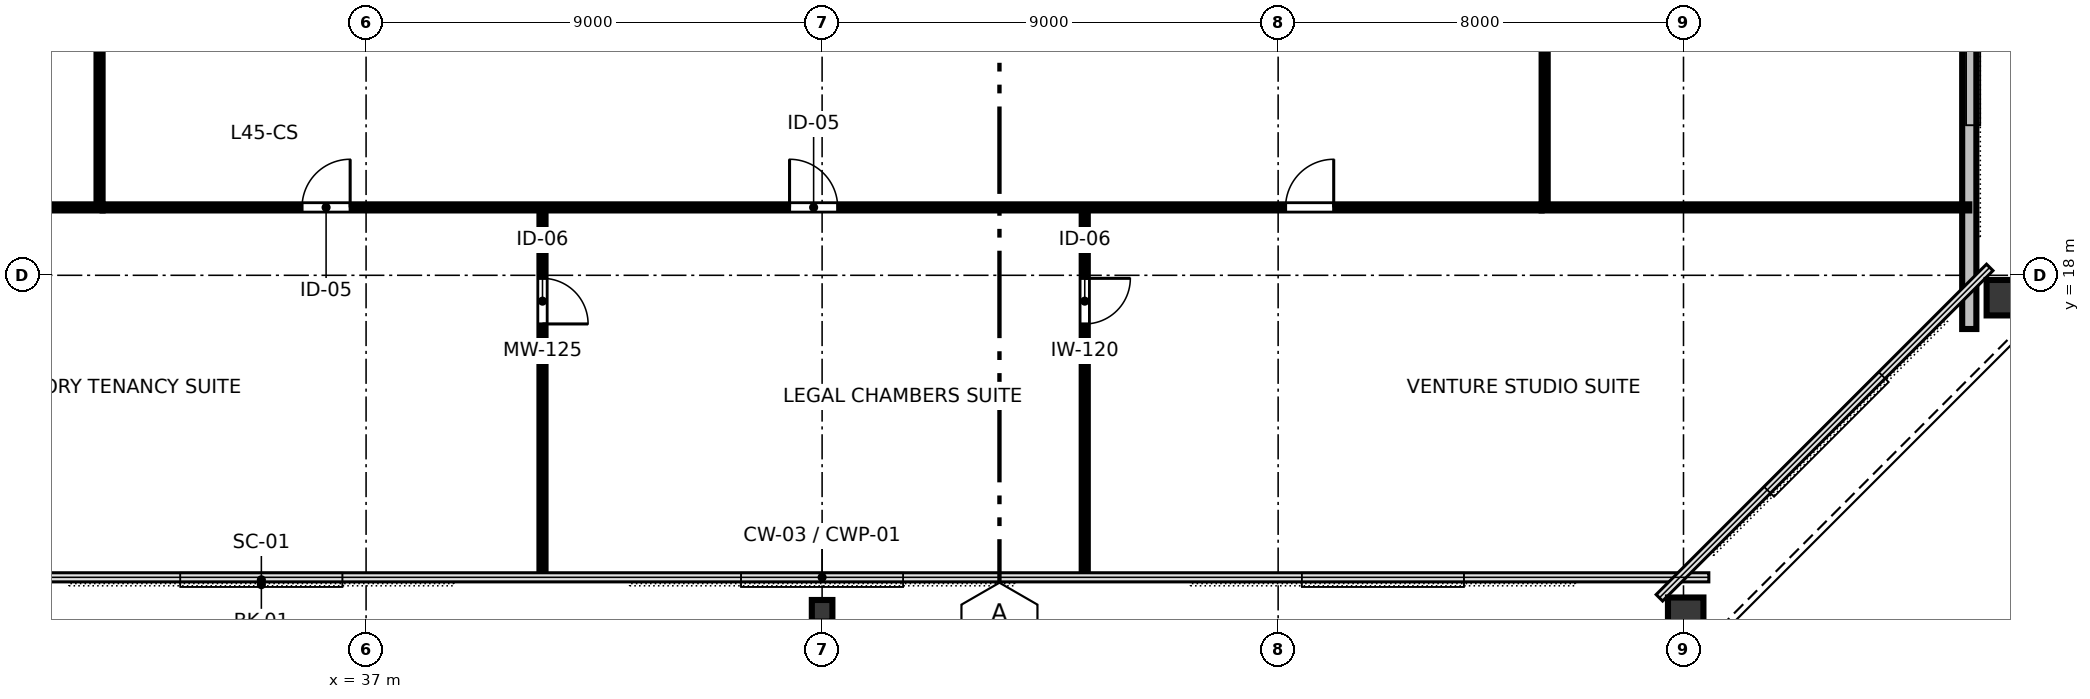
"""IFC4 building model, lengths in metres.
Left out: names, types, materials, properties, quantities, classifications, styles, units other than length and angle.
Written with IfcOpenShell. Run it as: python <this file> out.ifc"""

import sys

from ifc_helpers import new_model, si_unit, direction, frame, frame_2d, origin, origin_2d, place, context, subcontext, project, spatial, rectangle, hollow_rectangle, i_section, extrude, element, fill, save


model = new_model("IFC4")
c1 = context("Model", 3, precision=1e-05, world=origin(), true_north=direction((0.0, 1.0)))
c2 = subcontext(c1, "Body", "Model", "MODEL_VIEW")
j1 = project(units=[si_unit("LENGTHUNIT", "METRE"), si_unit("PLANEANGLEUNIT", "RADIAN")], contexts=[c1])
p1 = place(None, origin())
s1 = spatial("IfcSite", under=j1, at=p1, CompositionType="ELEMENT")
p2 = place(p1, origin())
s2 = spatial("IfcBuilding", under=s1, at=p2, CompositionType="ELEMENT")
p3 = place(p2, frame((0.0, 0.0, 172.0)))
s3 = spatial("IfcBuildingStorey", under=s2, at=p3, CompositionType="ELEMENT", Elevation=172.0)
p4 = place(p3, frame((46.0, 11.38, 0.0), z_axis=(0.0, 0.046233027607, 0.998930681858), x_axis=(-1.0, 0.0, 0.0)))
e1 = element("IfcColumn", 1, at=p4, inside=s3, PredefinedType="COLUMN", context=c2, shape_type="SweptSolid", body=[
    extrude(i_section(OverallWidth=0.406, OverallDepth=0.425, WebThickness=0.033, FlangeThickness=0.052, FilletRadius=0.025, at=origin_2d()), origin(), (0.0, 0.0, 1.0), 4.763),
])
p5 = place(p3, frame((63.043, 11.217, 0.0), z_axis=(-0.062460790535, 0.046397982813, 0.996968342946), x_axis=(-0.596311896623, -0.802752839886, 0.0)))
e2 = element("IfcColumn", 2, at=p5, inside=s3, PredefinedType="COLUMN", context=c2, shape_type="SweptSolid", body=[
    extrude(hollow_rectangle(XDim=0.7, YDim=0.85, WallThickness=0.04, at=origin_2d()), origin(), (0.0, 0.0, 1.0), 4.772),
])
p6 = place(p3, frame((69.407, 17.558, 0.0), z_axis=(-0.054739996676, 0.054074931296, 0.997035322629), x_axis=(0.709306139229, -0.700688401089, 0.076945210577)))
e3 = element("IfcColumn", 3, at=p6, inside=s3, PredefinedType="COLUMN", context=c2, shape_type="SweptSolid", body=[
    extrude(hollow_rectangle(XDim=0.7, YDim=0.85, WallThickness=0.04, at=origin_2d()), origin(), (0.0, 0.0, 1.0), 4.772),
])
p7 = place(p3, frame((68.64, 16.94, 0.0), z_axis=(0.0, 0.0, 1.0), x_axis=(0.0, 1.0, 0.0)))
e4 = element("IfcWall", 4, at=p7, inside=s3, PredefinedType="STANDARD", context=c2, shape_type="SweptSolid", body=[
    extrude(rectangle(XDim=30.12, YDim=0.28, at=frame_2d((15.06, 0.0))), origin(), (0.0, 0.0, 1.0), 4.76),
])
p8 = place(p7, frame((16.56, 0.0, 0.0)))
e5 = element("IfcOpeningElement", 5, at=p8, cuts=e4, PredefinedType="OPENING", context=c2, shape_type="SweptSolid", body=[
    extrude(rectangle(XDim=1.8, YDim=2.2, at=frame_2d((0.9, 1.1))), frame((0.0, 0.15, 0.0), z_axis=(0.0, -1.0, 0.0), x_axis=(1.0, 0.0, 0.0)), (0.0, 0.0, 1.0), 0.3),
])
p9 = place(p7, frame((6.083, 0.0, 0.8)))
e6 = element("IfcOpeningElement", 6, at=p9, cuts=e4, PredefinedType="OPENING", context=c2, shape_type="SweptSolid", body=[
    extrude(rectangle(XDim=2.0, YDim=1.95, at=frame_2d((1.0, 0.975))), frame((0.0, 0.15, 0.0), z_axis=(0.0, -1.0, 0.0), x_axis=(1.0, 0.0, 0.0)), (0.0, 0.0, 1.0), 0.3),
])
p10 = place(p7, frame((10.071, 0.0, 0.8)))
e7 = element("IfcOpeningElement", 7, at=p10, cuts=e4, PredefinedType="OPENING", context=c2, shape_type="SweptSolid", body=[
    extrude(rectangle(XDim=2.0, YDim=1.95, at=frame_2d((1.0, 0.975))), frame((0.0, 0.15, 0.0), z_axis=(0.0, -1.0, 0.0), x_axis=(1.0, 0.0, 0.0)), (0.0, 0.0, 1.0), 0.3),
])
p11 = place(p7, frame((22.037, 0.0, 0.8)))
e8 = element("IfcOpeningElement", 8, at=p11, cuts=e4, PredefinedType="OPENING", context=c2, shape_type="SweptSolid", body=[
    extrude(rectangle(XDim=2.0, YDim=1.95, at=frame_2d((1.0, 0.975))), frame((0.0, 0.15, 0.0), z_axis=(0.0, -1.0, 0.0), x_axis=(1.0, 0.0, 0.0)), (0.0, 0.0, 1.0), 0.3),
])
p12 = place(p3, frame((40.482, 19.34, 0.0), z_axis=(0.0, 0.0, 1.0), x_axis=(0.0, -1.0, 0.0)))
e9 = element("IfcWall", 9, at=p12, inside=s3, PredefinedType="MOVABLE", context=c2, shape_type="SweptSolid", body=[
    extrude(rectangle(XDim=7.3, YDim=0.12, at=frame_2d((3.65, 0.0))), origin(), (0.0, 0.0, 1.0), 4.04),
])
p13 = place(p12, frame((1.4, 0.0, 0.0)))
e10 = element("IfcOpeningElement", 10, at=p13, cuts=e9, PredefinedType="OPENING", context=c2, shape_type="SweptSolid", body=[
    extrude(rectangle(XDim=0.9, YDim=2.15, at=frame_2d((0.45, 1.075))), frame((0.0, 0.07, 0.0), z_axis=(0.0, -1.0, 0.0), x_axis=(1.0, 0.0, 0.0)), (0.0, 0.0, 1.0), 0.14),
])
p14 = place(p3, frame((51.183, 19.34, 0.0), z_axis=(0.0, 0.0, 1.0), x_axis=(0.0, -1.0, 0.0)))
e11 = element("IfcWall", 11, at=p14, inside=s3, PredefinedType="PARTITIONING", context=c2, shape_type="SweptSolid", body=[
    extrude(rectangle(XDim=7.3, YDim=0.12, at=frame_2d((3.65, 0.0))), origin(), (0.0, 0.0, 1.0), 4.04),
])
p15 = place(p14, frame((1.4, 0.0, 0.0)))
e12 = element("IfcOpeningElement", 12, at=p15, cuts=e11, PredefinedType="OPENING", context=c2, shape_type="SweptSolid", body=[
    extrude(rectangle(XDim=0.9, YDim=2.15, at=frame_2d((0.45, 1.075))), frame((0.0, 0.07, 0.0), z_axis=(0.0, -1.0, 0.0), x_axis=(1.0, 0.0, 0.0)), (0.0, 0.0, 1.0), 0.14),
])
p16 = place(p3, frame((31.8, 19.34, 0.0), z_axis=(0.0, 0.0, 1.0), x_axis=(1.0, 0.0, 0.0)))
e13 = element("IfcWall", 13, at=p16, inside=s3, PredefinedType="PARTITIONING", context=c2, shape_type="SweptSolid", body=[
    extrude(rectangle(XDim=28.4, YDim=0.12, at=frame_2d((14.2, 0.0))), origin(), (0.0, 0.0, 1.0), 4.04),
])
p17 = place(p16, frame((3.936, 0.0, 0.0)))
e14 = element("IfcOpeningElement", 14, at=p17, cuts=e13, PredefinedType="OPENING", context=c2, shape_type="SweptSolid", body=[
    extrude(rectangle(XDim=0.95, YDim=2.15, at=frame_2d((0.475, 1.075))), frame((0.0, 0.07, 0.0), z_axis=(0.0, -1.0, 0.0), x_axis=(1.0, 0.0, 0.0)), (0.0, 0.0, 1.0), 0.14),
])
p18 = place(p16, frame((13.558, 0.0, 0.0)))
e15 = element("IfcOpeningElement", 15, at=p18, cuts=e13, PredefinedType="OPENING", context=c2, shape_type="SweptSolid", body=[
    extrude(rectangle(XDim=0.95, YDim=2.15, at=frame_2d((0.475, 1.075))), frame((0.0, 0.07, 0.0), z_axis=(0.0, -1.0, 0.0), x_axis=(1.0, 0.0, 0.0)), (0.0, 0.0, 1.0), 0.14),
])
p19 = place(p16, frame((23.347, 0.0, 0.0)))
e16 = element("IfcOpeningElement", 16, at=p19, cuts=e13, PredefinedType="OPENING", context=c2, shape_type="SweptSolid", body=[
    extrude(rectangle(XDim=0.95, YDim=2.15, at=frame_2d((0.475, 1.075))), frame((0.0, 0.07, 0.0), z_axis=(0.0, -1.0, 0.0), x_axis=(1.0, 0.0, 0.0)), (0.0, 0.0, 1.0), 0.14),
])
p20 = place(p3, frame((31.74, 19.4, 0.0), z_axis=(0.0, 0.0, 1.0), x_axis=(0.0, 1.0, 0.0)))
e17 = element("IfcWall", 17, at=p20, inside=s3, PredefinedType="PARTITIONING", context=c2, shape_type="SweptSolid", body=[
    extrude(rectangle(XDim=11.58, YDim=0.12, at=frame_2d((5.79, 0.0))), origin(), (0.0, 0.0, 1.0), 4.04),
])
p21 = place(p20, frame((3.701, 0.0, 0.0)))
e18 = element("IfcOpeningElement", 18, at=p21, cuts=e17, PredefinedType="OPENING", context=c2, shape_type="SweptSolid", body=[
    extrude(rectangle(XDim=0.95, YDim=2.15, at=frame_2d((0.475, 1.075))), frame((0.0, 0.07, 0.0), z_axis=(0.0, -1.0, 0.0), x_axis=(1.0, 0.0, 0.0)), (0.0, 0.0, 1.0), 0.14),
])
p22 = place(p20, frame((9.391, 0.0, 0.0)))
e19 = element("IfcOpeningElement", 19, at=p22, cuts=e17, PredefinedType="OPENING", context=c2, shape_type="SweptSolid", body=[
    extrude(rectangle(XDim=0.95, YDim=2.15, at=frame_2d((0.475, 1.075))), frame((0.0, 0.07, 0.0), z_axis=(0.0, -1.0, 0.0), x_axis=(1.0, 0.0, 0.0)), (0.0, 0.0, 1.0), 0.14),
])
p23 = place(p3, frame((60.26, 19.4, 0.0), z_axis=(0.0, 0.0, 1.0), x_axis=(0.0, 1.0, 0.0)))
e20 = element("IfcWall", 20, at=p23, inside=s3, PredefinedType="PARTITIONING", context=c2, shape_type="SweptSolid", body=[
    extrude(rectangle(XDim=11.58, YDim=0.12, at=frame_2d((5.79, 0.0))), origin(), (0.0, 0.0, 1.0), 4.04),
])
p24 = place(p23, frame((3.275, 0.0, 0.0)))
e21 = element("IfcOpeningElement", 21, at=p24, cuts=e20, PredefinedType="OPENING", context=c2, shape_type="SweptSolid", body=[
    extrude(rectangle(XDim=0.95, YDim=2.15, at=frame_2d((0.475, 1.075))), frame((0.0, 0.07, 0.0), z_axis=(0.0, -1.0, 0.0), x_axis=(1.0, 0.0, 0.0)), (0.0, 0.0, 1.0), 0.14),
])
p25 = place(p23, frame((8.965, 0.0, 0.0)))
e22 = element("IfcOpeningElement", 22, at=p25, cuts=e20, PredefinedType="OPENING", context=c2, shape_type="SweptSolid", body=[
    extrude(rectangle(XDim=0.95, YDim=2.15, at=frame_2d((0.475, 1.075))), frame((0.0, 0.07, 0.0), z_axis=(0.0, -1.0, 0.0), x_axis=(1.0, 0.0, 0.0)), (0.0, 0.0, 1.0), 0.14),
])
for number, where, z_axis, x_axis in (
    (23, (31.8, 19.34, 0.0), (0.0, 0.0, 1.0), (-1.0, 0.0, 0.0)),
    (24, (60.2, 19.34, 0.0), (0.0, 0.0, 1.0), (1.0, 0.0, 0.0)),
):
    element("IfcWall", number, at=place(p3, frame(where, z_axis=z_axis, x_axis=x_axis)), inside=s3, PredefinedType="PARTITIONING", context=c2, shape_type="SweptSolid", body=[
        extrude(rectangle(XDim=8.44, YDim=0.12, at=frame_2d((4.22, 0.0))), origin(), (0.0, 0.0, 1.0), 4.04),
    ])
p26 = place(p13, origin())
e25 = element("IfcDoor", 25, at=p26, inside=s3, OperationType="SINGLE_SWING_RIGHT", PredefinedType="DOOR", context=c2, shape_type="SweptSolid", body=[
    extrude(rectangle(XDim=0.9, YDim=2.15, at=frame_2d((0.45, 1.075))), frame((0.0, 0.025, 0.0), z_axis=(0.0, -1.0, 0.0), x_axis=(1.0, 0.0, 0.0)), (0.0, 0.0, 1.0), 0.05),
])
fill(e10, e25)
p27 = place(p15, origin())
e26 = element("IfcDoor", 26, at=p27, inside=s3, OperationType="SINGLE_SWING_LEFT", PredefinedType="DOOR", context=c2, shape_type="SweptSolid", body=[
    extrude(rectangle(XDim=0.9, YDim=2.15, at=frame_2d((0.45, 1.075))), frame((0.0, 0.025, 0.0), z_axis=(0.0, -1.0, 0.0), x_axis=(1.0, 0.0, 0.0)), (0.0, 0.0, 1.0), 0.05),
])
fill(e12, e26)
p28 = place(p17, origin())
e27 = element("IfcDoor", 27, at=p28, inside=s3, OperationType="SINGLE_SWING_RIGHT", PredefinedType="DOOR", context=c2, shape_type="SweptSolid", body=[
    extrude(rectangle(XDim=0.95, YDim=2.15, at=frame_2d((0.475, 1.075))), frame((0.0, 0.025, 0.0), z_axis=(0.0, -1.0, 0.0), x_axis=(1.0, 0.0, 0.0)), (0.0, 0.0, 1.0), 0.05),
])
fill(e14, e27)
p29 = place(p18, origin())
e28 = element("IfcDoor", 28, at=p29, inside=s3, OperationType="SINGLE_SWING_LEFT", PredefinedType="DOOR", context=c2, shape_type="SweptSolid", body=[
    extrude(rectangle(XDim=0.95, YDim=2.15, at=frame_2d((0.475, 1.075))), frame((0.0, 0.025, 0.0), z_axis=(0.0, -1.0, 0.0), x_axis=(1.0, 0.0, 0.0)), (0.0, 0.0, 1.0), 0.05),
])
fill(e15, e28)
p30 = place(p19, origin())
e29 = element("IfcDoor", 29, at=p30, inside=s3, OperationType="SINGLE_SWING_RIGHT", PredefinedType="DOOR", context=c2, shape_type="SweptSolid", body=[
    extrude(rectangle(XDim=0.95, YDim=2.15, at=frame_2d((0.475, 1.075))), frame((0.0, 0.025, 0.0), z_axis=(0.0, -1.0, 0.0), x_axis=(1.0, 0.0, 0.0)), (0.0, 0.0, 1.0), 0.05),
])
fill(e16, e29)
save(model, sys.argv[1])
